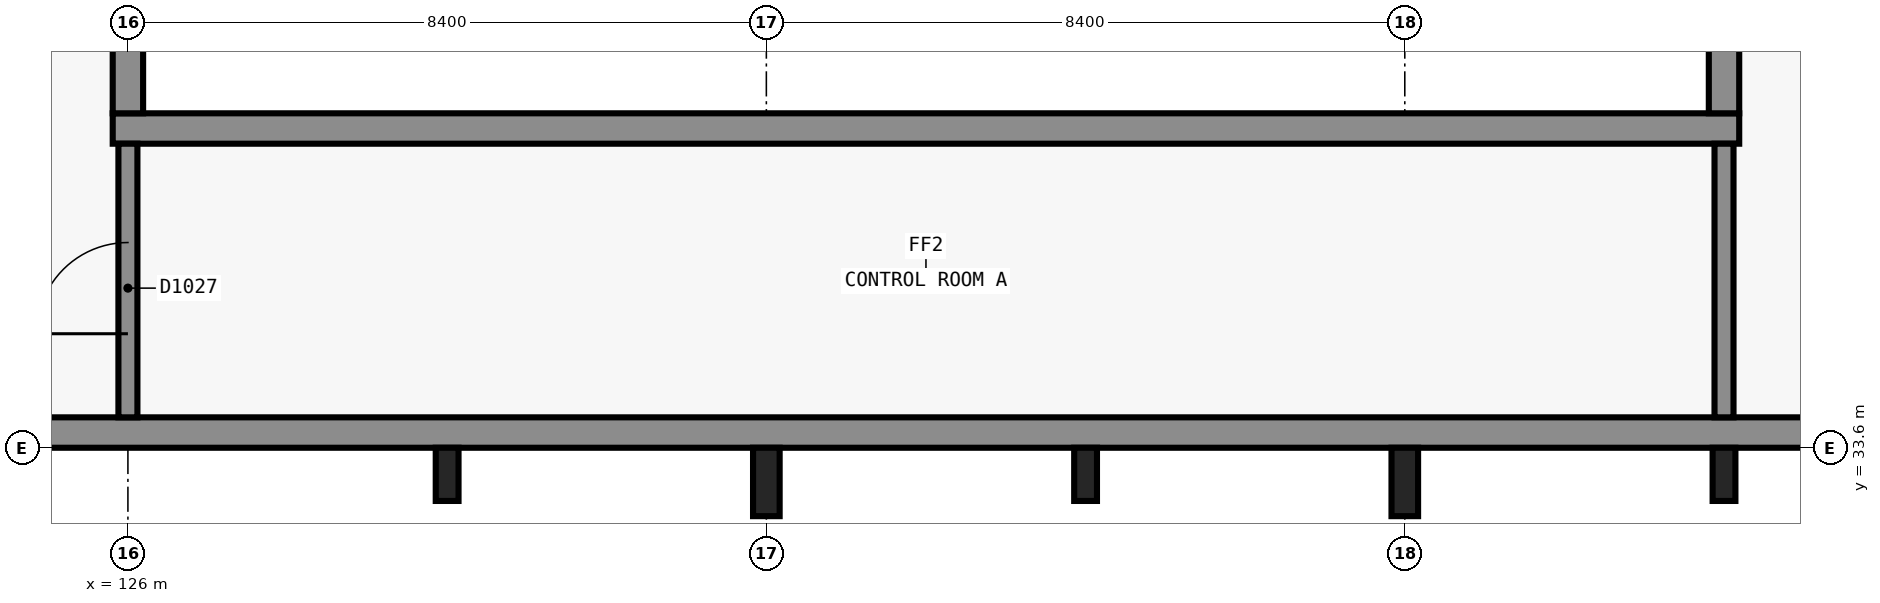
"""IFC4 building model, lengths in metres.
Left out: names, types, materials, properties, quantities, classifications, styles, units other than length and angle.
Written with IfcOpenShell. Run it as: python <this file> out.ifc"""

import sys

from ifc_helpers import new_model, si_unit, direction, frame, frame_2d, origin, origin_2d, place, context, subcontext, project, spatial, rectangle, extrude, element, fill, save


model = new_model("IFC4")
c1 = context("Model", 3, precision=1e-05, world=origin(), true_north=direction((0.0, 1.0)))
c2 = subcontext(c1, "Body", "Model", "MODEL_VIEW")
j1 = project(units=[si_unit("LENGTHUNIT", "METRE"), si_unit("PLANEANGLEUNIT", "RADIAN")], contexts=[c1])
p1 = place(None, origin())
s1 = spatial("IfcSite", under=j1, at=p1, CompositionType="ELEMENT")
p2 = place(p1, origin())
s2 = spatial("IfcBuilding", under=s1, at=p2, CompositionType="ELEMENT")
p3 = place(p2, frame((0.0, 0.0, 5.4)))
s3 = spatial("IfcBuildingStorey", under=s2, at=p3, CompositionType="ELEMENT", Elevation=5.4)
p4 = place(p3, frame((147.2, 37.8, 0.0), z_axis=(0.0, 0.0, 1.0), x_axis=(-1.0, 0.0, 0.0)))
e1 = element("IfcWall", 1, at=p4, inside=s3, PredefinedType="SHEAR", context=c2, shape_type="SweptSolid", body=[
    extrude(rectangle(XDim=21.4, YDim=0.4, at=frame_2d((10.7, 0.0))), origin(), (0.0, 0.0, 1.0), 4.8),
])
for number, where, z_axis, x_axis in (
    (2, (126.0, 38.0, 0.0), (0.0, 0.0, 1.0), (0.0, 1.0, 0.0)),
    (3, (147.0, 66.8, 0.0), (0.0, 0.0, 1.0), (0.0, -1.0, 0.0)),
):
    element("IfcWall", number, at=place(p3, frame(where, z_axis=z_axis, x_axis=x_axis)), inside=s3, PredefinedType="SHEAR", context=c2, shape_type="SweptSolid", body=[
        extrude(rectangle(XDim=28.8, YDim=0.4, at=frame_2d((14.4, 0.0))), origin(), (0.0, 0.0, 1.0), 4.8),
    ])
p5 = place(p3, frame((163.2, 33.8, 0.0), z_axis=(0.0, 0.0, 1.0), x_axis=(-1.0, 0.0, 0.0)))
e4 = element("IfcWall", 4, at=p5, inside=s3, PredefinedType="SHEAR", context=c2, shape_type="SweptSolid", body=[
    extrude(rectangle(XDim=40.8, YDim=0.4, at=frame_2d((20.4, 0.0))), origin(), (0.0, 0.0, 1.0), 4.8),
])
p6 = place(p3, frame((130.2, 33.25, 0.0), z_axis=(0.0, 0.0, 1.0), x_axis=(1.0, 0.0, 0.0)))
e5 = element("IfcColumn", 5, at=p6, inside=s3, PredefinedType="PILASTER", context=c2, shape_type="SweptSolid", body=[
    extrude(rectangle(XDim=0.3, YDim=0.7, at=origin_2d()), origin(), (0.0, 0.0, 1.0), 4.8),
])
p7 = place(p3, frame((134.4, 33.15, 0.0), z_axis=(0.0, 0.0, 1.0), x_axis=(1.0, 0.0, 0.0)))
e6 = element("IfcColumn", 6, at=p7, inside=s3, PredefinedType="PILASTER", context=c2, shape_type="SweptSolid", body=[
    extrude(rectangle(XDim=0.35, YDim=0.9, at=origin_2d()), origin(), (0.0, 0.0, 1.0), 4.8),
])
p8 = place(p3, frame((138.6, 33.25, 0.0), z_axis=(0.0, 0.0, 1.0), x_axis=(1.0, 0.0, 0.0)))
e7 = element("IfcColumn", 7, at=p8, inside=s3, PredefinedType="PILASTER", context=c2, shape_type="SweptSolid", body=[
    extrude(rectangle(XDim=0.3, YDim=0.7, at=origin_2d()), origin(), (0.0, 0.0, 1.0), 4.8),
])
p9 = place(p3, frame((142.8, 33.15, 0.0), z_axis=(0.0, 0.0, 1.0), x_axis=(1.0, 0.0, 0.0)))
e8 = element("IfcColumn", 8, at=p9, inside=s3, PredefinedType="PILASTER", context=c2, shape_type="SweptSolid", body=[
    extrude(rectangle(XDim=0.35, YDim=0.9, at=origin_2d()), origin(), (0.0, 0.0, 1.0), 4.8),
])
p10 = place(p3, frame((147.0, 33.25, 0.0), z_axis=(0.0, 0.0, 1.0), x_axis=(1.0, 0.0, 0.0)))
e9 = element("IfcColumn", 9, at=p10, inside=s3, PredefinedType="PILASTER", context=c2, shape_type="SweptSolid", body=[
    extrude(rectangle(XDim=0.3, YDim=0.7, at=origin_2d()), origin(), (0.0, 0.0, 1.0), 4.8),
])
p11 = place(p3, frame((126.0, 34.0, 0.0), z_axis=(0.0, 0.0, 1.0), x_axis=(0.0, 1.0, 0.0)))
e10 = element("IfcWall", 10, at=p11, inside=s3, PredefinedType="PARTITIONING", context=c2, shape_type="SweptSolid", body=[
    extrude(rectangle(XDim=3.6, YDim=0.25, at=frame_2d((1.8, 0.0))), origin(), (0.0, 0.0, 1.0), 4.0),
])
p12 = place(p11, frame((1.1, 0.0, 0.0)))
e11 = element("IfcOpeningElement", 11, at=p12, cuts=e10, PredefinedType="OPENING", context=c2, shape_type="SweptSolid", body=[
    extrude(rectangle(XDim=1.2, YDim=2.1, at=frame_2d((0.6, 1.05))), frame((0.0, 0.135, 0.0), z_axis=(0.0, -1.0, 0.0), x_axis=(1.0, 0.0, 0.0)), (0.0, 0.0, 1.0), 0.27),
])
p13 = place(p3, frame((147.0, 34.0, 0.0), z_axis=(0.0, 0.0, 1.0), x_axis=(0.0, 1.0, 0.0)))
e12 = element("IfcWall", 12, at=p13, inside=s3, PredefinedType="PARTITIONING", context=c2, shape_type="SweptSolid", body=[
    extrude(rectangle(XDim=3.6, YDim=0.25, at=frame_2d((1.8, 0.0))), origin(), (0.0, 0.0, 1.0), 4.5),
])
p14 = place(p12, origin())
e13 = element("IfcDoor", 13, at=p14, inside=s3, OperationType="SINGLE_SWING_RIGHT", PredefinedType="DOOR", context=c2, shape_type="SweptSolid", body=[
    extrude(rectangle(XDim=1.2, YDim=2.1, at=frame_2d((0.6, 1.05))), frame((0.0, 0.025, 0.0), z_axis=(0.0, -1.0, 0.0), x_axis=(1.0, 0.0, 0.0)), (0.0, 0.0, 1.0), 0.05),
])
fill(e11, e13)
save(model, sys.argv[1])
